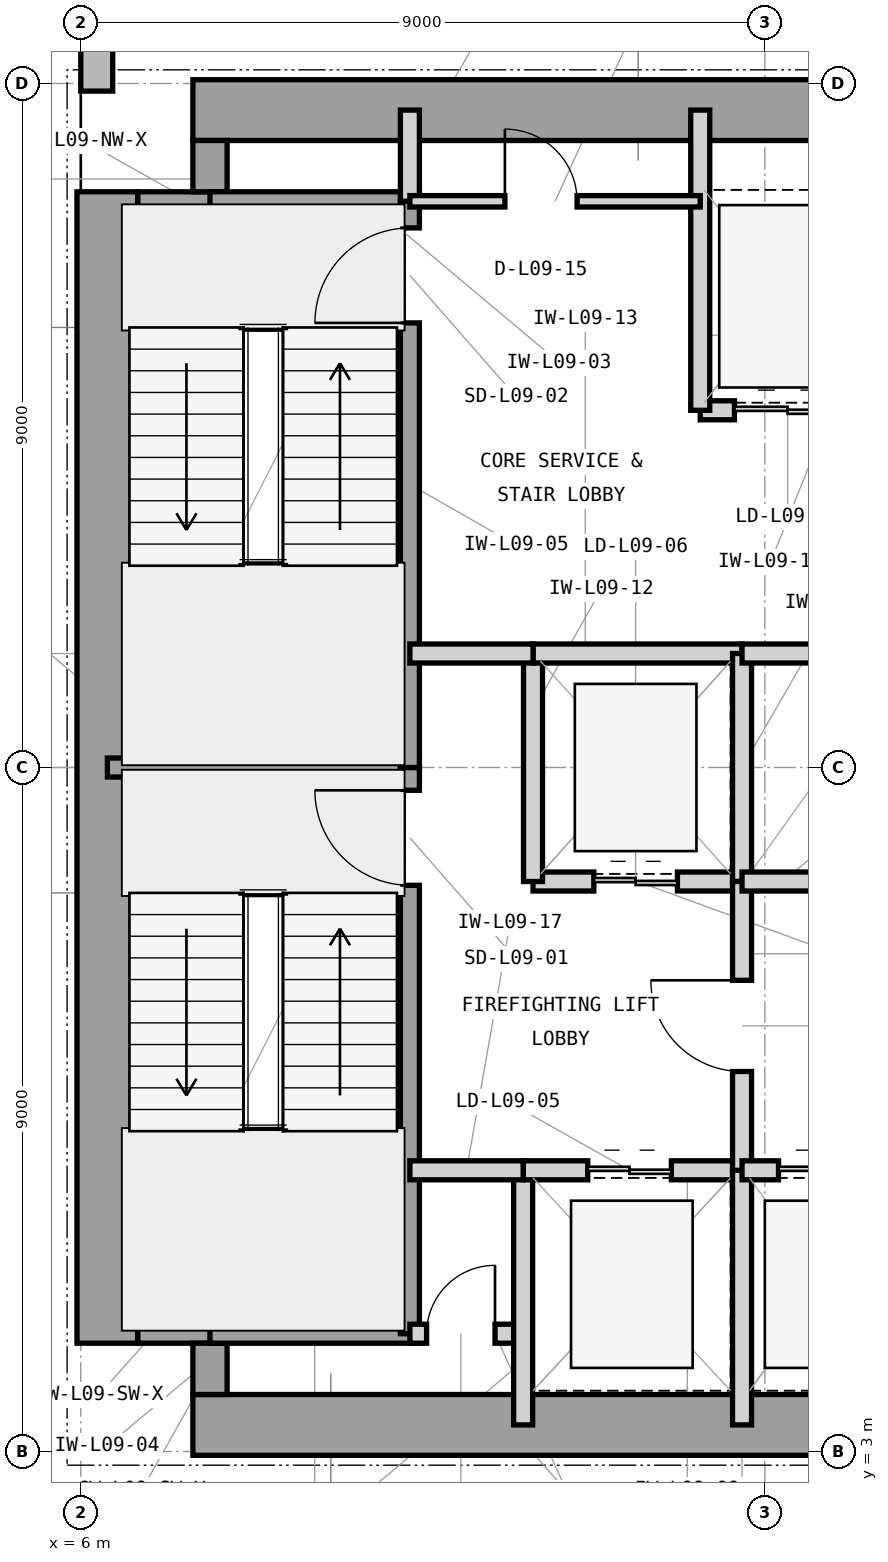
"""IFC4 building model, lengths in metres.
Left out: names, types, materials, properties, quantities, classifications, styles, units other than length and angle.
Written with IfcOpenShell. Run it as: python <this file> out.ifc"""

import sys

from ifc_helpers import new_model, si_unit, direction, frame, frame_2d, origin, place, context, subcontext, project, spatial, rectangle, extrude, element, fill, save


model = new_model("IFC4")
c1 = context("Model", 3, precision=1e-05, world=origin(), true_north=direction((0.0, 1.0)))
c2 = subcontext(c1, "Body", "Model", "MODEL_VIEW")
j1 = project(units=[si_unit("LENGTHUNIT", "METRE"), si_unit("PLANEANGLEUNIT", "RADIAN")], contexts=[c1])
p1 = place(None, origin())
s1 = spatial("IfcSite", under=j1, at=p1, CompositionType="ELEMENT")
p2 = place(p1, origin())
s2 = spatial("IfcBuilding", under=s1, at=p2, CompositionType="ELEMENT")
p3 = place(p2, frame((0.0, 0.0, 42.6)))
s3 = spatial("IfcBuildingStorey", under=s2, at=p3, CompositionType="ELEMENT", Elevation=42.6)
p4 = place(p3, frame((7.475, 3.35, 0.0), z_axis=(0.0, 0.0, 1.0), x_axis=(1.0, 0.0, 0.0)))
e1 = element("IfcWall", 1, at=p4, inside=s3, PredefinedType="SHEAR", context=c2, shape_type="SweptSolid", body=[
    extrude(rectangle(XDim=16.575, YDim=0.8, at=frame_2d((8.288, 0.0))), origin(), (0.0, 0.0, 1.0), 4.2),
])
p5 = place(p3, frame((6.35, 4.425, 0.0), z_axis=(0.0, 0.0, 1.0), x_axis=(0.0, 1.0, 0.0)))
e2 = element("IfcWall", 2, at=p5, inside=s3, PredefinedType="SHEAR", context=c2, shape_type="SweptSolid", body=[
    extrude(rectangle(XDim=15.15, YDim=0.8, at=frame_2d((7.575, 0.0))), origin(), (0.0, 0.0, 1.0), 4.2),
])
p6 = place(p3, frame((7.475, 20.65, 0.0), z_axis=(0.0, 0.0, 1.0), x_axis=(1.0, 0.0, 0.0)))
e3 = element("IfcWall", 3, at=p6, inside=s3, PredefinedType="SHEAR", context=c2, shape_type="SweptSolid", body=[
    extrude(rectangle(XDim=12.325, YDim=0.8, at=frame_2d((6.163, 0.0))), origin(), (0.0, 0.0, 1.0), 4.2),
])
p7 = place(p3, frame((6.75, 4.65, 0.0), z_axis=(0.0, 0.0, 1.0), x_axis=(1.0, 0.0, 0.0)))
e4 = element("IfcWall", 4, at=p7, inside=s3, PredefinedType="SHEAR", context=c2, shape_type="SweptSolid", body=[
    extrude(rectangle(XDim=1.175, YDim=0.45, at=frame_2d((0.587, 0.0))), origin(), (0.0, 0.0, 1.0), 4.2),
])
p8 = place(p3, frame((7.7, 3.75, 0.0), z_axis=(0.0, 0.0, 1.0), x_axis=(0.0, 1.0, 0.0)))
e5 = element("IfcWall", 5, at=p8, inside=s3, PredefinedType="SHEAR", context=c2, shape_type="SweptSolid", body=[
    extrude(rectangle(XDim=0.675, YDim=0.45, at=frame_2d((0.337, 0.0))), origin(), (0.0, 0.0, 1.0), 4.2),
])
p9 = place(p3, frame((6.75, 19.35, 0.0), z_axis=(0.0, 0.0, 1.0), x_axis=(1.0, 0.0, 0.0)))
e6 = element("IfcWall", 6, at=p9, inside=s3, PredefinedType="SHEAR", context=c2, shape_type="SweptSolid", body=[
    extrude(rectangle(XDim=1.175, YDim=0.45, at=frame_2d((0.587, 0.0))), origin(), (0.0, 0.0, 1.0), 4.2),
])
p10 = place(p3, frame((7.7, 19.575, 0.0), z_axis=(0.0, 0.0, 1.0), x_axis=(0.0, 1.0, 0.0)))
e7 = element("IfcWall", 7, at=p10, inside=s3, PredefinedType="SHEAR", context=c2, shape_type="SweptSolid", body=[
    extrude(rectangle(XDim=0.675, YDim=0.45, at=frame_2d((0.337, 0.0))), origin(), (0.0, 0.0, 1.0), 4.2),
])
p11 = place(p3, frame((6.21, 49.4, 0.0), z_axis=(0.0, 0.0, 1.0), x_axis=(0.0, -1.0, 0.0)))
e8 = element("IfcWall", 8, at=p11, inside=s3, PredefinedType="STANDARD", context=c2, shape_type="SweptSolid", body=[
    extrude(rectangle(XDim=28.5, YDim=0.42, at=frame_2d((14.25, 0.0))), origin(), (0.0, 0.0, 1.0), 3.98),
])
p12 = place(p11, frame((15.225, 0.0, 0.85)))
e9 = element("IfcOpeningElement", 9, at=p12, cuts=e8, PredefinedType="OPENING", context=c2, shape_type="SweptSolid", body=[
    extrude(rectangle(XDim=2.8, YDim=2.45, at=frame_2d((1.4, 1.225))), frame((0.0, 0.22, 0.0), z_axis=(0.0, -1.0, 0.0), x_axis=(1.0, 0.0, 0.0)), (0.0, 0.0, 1.0), 0.44),
])
p13 = place(p3, frame((6.35, 12.0, 0.0), z_axis=(0.0, 0.0, 1.0), x_axis=(1.0, 0.0, 0.0)))
e10 = element("IfcWall", 10, at=p13, inside=s3, PredefinedType="SHEAR", context=c2, shape_type="SweptSolid", body=[
    extrude(rectangle(XDim=4.105, YDim=0.25, at=frame_2d((2.052, 0.0))), origin(), (0.0, 0.0, 1.0), 4.2),
])
for number, where, z_axis, x_axis in (
    (11, (7.7, 4.55, 0.0), (0.0, 0.0, 1.0), (1.0, 0.0, 0.0)),
    (12, (7.7, 19.45, 0.0), (0.0, 0.0, 1.0), (1.0, 0.0, 0.0)),
):
    element("IfcWall", number, at=place(p3, frame(where, z_axis=z_axis, x_axis=x_axis)), inside=s3, PredefinedType="SHEAR", context=c2, shape_type="SweptSolid", body=[
        extrude(rectangle(XDim=2.755, YDim=0.25, at=frame_2d((1.377, 0.0))), origin(), (0.0, 0.0, 1.0), 4.2),
    ])
p14 = place(p3, frame((10.33, 4.55, 0.0), z_axis=(0.0, 0.0, 1.0), x_axis=(0.0, 1.0, 0.0)))
e13 = element("IfcWall", 13, at=p14, inside=s3, PredefinedType="SHEAR", context=c2, shape_type="SweptSolid", body=[
    extrude(rectangle(XDim=7.45, YDim=0.25, at=frame_2d((3.725, 0.0))), origin(), (0.0, 0.0, 1.0), 4.2),
])
p15 = place(p14, frame((5.9, 0.0, 0.0)))
e14 = element("IfcOpeningElement", 14, at=p15, cuts=e13, PredefinedType="OPENING", context=c2, shape_type="SweptSolid", body=[
    extrude(rectangle(XDim=1.25, YDim=2.2, at=frame_2d((0.625, 1.1))), frame((0.0, 0.135, 0.0), z_axis=(0.0, -1.0, 0.0), x_axis=(1.0, 0.0, 0.0)), (0.0, 0.0, 1.0), 0.27),
])
p16 = place(p3, frame((10.33, 12.0, 0.0), z_axis=(0.0, 0.0, 1.0), x_axis=(0.0, 1.0, 0.0)))
e15 = element("IfcWall", 15, at=p16, inside=s3, PredefinedType="SHEAR", context=c2, shape_type="SweptSolid", body=[
    extrude(rectangle(XDim=7.45, YDim=0.25, at=frame_2d((3.725, 0.0))), origin(), (0.0, 0.0, 1.0), 4.2),
])
p17 = place(p16, frame((5.85, 0.0, 0.0)))
e16 = element("IfcOpeningElement", 16, at=p17, cuts=e15, PredefinedType="OPENING", context=c2, shape_type="SweptSolid", body=[
    extrude(rectangle(XDim=1.25, YDim=2.2, at=frame_2d((0.625, 1.1))), frame((0.0, 0.135, 0.0), z_axis=(0.0, -1.0, 0.0), x_axis=(1.0, 0.0, 0.0)), (0.0, 0.0, 1.0), 0.27),
])
p18 = place(p3, frame((10.33, 4.55, 0.0), z_axis=(0.0, 0.0, 1.0), x_axis=(1.0, 0.0, 0.0)))
e17 = element("IfcWall", 17, at=p18, inside=s3, PredefinedType="PARTITIONING", context=c2, shape_type="SweptSolid", body=[
    extrude(rectangle(XDim=1.49, YDim=0.25, at=frame_2d((0.745, 0.0))), origin(), (0.0, 0.0, 1.0), 3.97),
])
p19 = place(p18, frame((0.22, 0.0, 0.0)))
e18 = element("IfcOpeningElement", 18, at=p19, cuts=e17, PredefinedType="OPENING", context=c2, shape_type="SweptSolid", body=[
    extrude(rectangle(XDim=0.9, YDim=2.1, at=frame_2d((0.45, 1.05))), frame((0.0, 0.135, 0.0), z_axis=(0.0, -1.0, 0.0), x_axis=(1.0, 0.0, 0.0)), (0.0, 0.0, 1.0), 0.27),
])
p20 = place(p3, frame((11.82, 3.35, 0.0), z_axis=(0.0, 0.0, 1.0), x_axis=(0.0, 1.0, 0.0)))
e19 = element("IfcWall", 19, at=p20, inside=s3, PredefinedType="PARTITIONING", context=c2, shape_type="SweptSolid", body=[
    extrude(rectangle(XDim=3.35, YDim=0.25, at=frame_2d((1.675, 0.0))), origin(), (0.0, 0.0, 1.0), 3.97),
])
p21 = place(p3, frame((10.33, 19.45, 0.0), z_axis=(0.0, 0.0, 1.0), x_axis=(0.0, 1.0, 0.0)))
e20 = element("IfcWall", 20, at=p21, inside=s3, PredefinedType="PARTITIONING", context=c2, shape_type="SweptSolid", body=[
    extrude(rectangle(XDim=1.2, YDim=0.25, at=frame_2d((0.6, 0.0))), origin(), (0.0, 0.0, 1.0), 3.114),
])
p22 = place(p3, frame((11.82, 6.7, 0.0), z_axis=(0.0, 0.0, 1.0), x_axis=(1.0, 0.0, 0.0)))
e21 = element("IfcWall", 21, at=p22, inside=s3, PredefinedType="PARTITIONING", context=c2, shape_type="SweptSolid", body=[
    extrude(rectangle(XDim=2.88, YDim=0.25, at=frame_2d((1.44, 0.0))), origin(), (0.0, 0.0, 1.0), 3.426),
])
p23 = place(p22, frame((0.85, 0.0, 0.0)))
e22 = element("IfcOpeningElement", 22, at=p23, cuts=e21, PredefinedType="OPENING", context=c2, shape_type="SweptSolid", body=[
    extrude(rectangle(XDim=1.1, YDim=2.25, at=frame_2d((0.55, 1.125))), frame((0.0, 0.135, 0.0), z_axis=(0.0, -1.0, 0.0), x_axis=(1.0, 0.0, 0.0)), (0.0, 0.0, 1.0), 0.27),
])
p24 = place(p3, frame((14.7, 3.35, 0.0), z_axis=(0.0, 0.0, 1.0), x_axis=(0.0, 1.0, 0.0)))
e23 = element("IfcWall", 23, at=p24, inside=s3, PredefinedType="PARTITIONING", context=c2, shape_type="SweptSolid", body=[
    extrude(rectangle(XDim=3.35, YDim=0.25, at=frame_2d((1.675, 0.0))), origin(), (0.0, 0.0, 1.0), 3.97),
])
p25 = place(p3, frame((11.95, 10.5, 0.0), z_axis=(0.0, 0.0, 1.0), x_axis=(1.0, 0.0, 0.0)))
e24 = element("IfcWall", 24, at=p25, inside=s3, PredefinedType="PARTITIONING", context=c2, shape_type="SweptSolid", body=[
    extrude(rectangle(XDim=2.75, YDim=0.25, at=frame_2d((1.375, 0.0))), origin(), (0.0, 0.0, 1.0), 3.426),
])
p26 = place(p25, frame((0.8, 0.0, 0.0)))
e25 = element("IfcOpeningElement", 25, at=p26, cuts=e24, PredefinedType="OPENING", context=c2, shape_type="SweptSolid", body=[
    extrude(rectangle(XDim=1.1, YDim=2.25, at=frame_2d((0.55, 1.125))), frame((0.0, 0.135, 0.0), z_axis=(0.0, -1.0, 0.0), x_axis=(1.0, 0.0, 0.0)), (0.0, 0.0, 1.0), 0.27),
])
p27 = place(p3, frame((11.95, 10.5, 0.0), z_axis=(0.0, 0.0, 1.0), x_axis=(0.0, 1.0, 0.0)))
e26 = element("IfcWall", 26, at=p27, inside=s3, PredefinedType="PARTITIONING", context=c2, shape_type="SweptSolid", body=[
    extrude(rectangle(XDim=3.0, YDim=0.25, at=frame_2d((1.5, 0.0))), origin(), (0.0, 0.0, 1.0), 3.97),
])
p28 = place(p3, frame((11.95, 13.5, 0.0), z_axis=(0.0, 0.0, 1.0), x_axis=(1.0, 0.0, 0.0)))
e27 = element("IfcWall", 27, at=p28, inside=s3, PredefinedType="PARTITIONING", context=c2, shape_type="SweptSolid", body=[
    extrude(rectangle(XDim=2.75, YDim=0.25, at=frame_2d((1.375, 0.0))), origin(), (0.0, 0.0, 1.0), 3.426),
])
p29 = place(p3, frame((14.7, 10.5, 0.0), z_axis=(0.0, 0.0, 1.0), x_axis=(0.0, 1.0, 0.0)))
e28 = element("IfcWall", 28, at=p29, inside=s3, PredefinedType="PARTITIONING", context=c2, shape_type="SweptSolid", body=[
    extrude(rectangle(XDim=3.0, YDim=0.25, at=frame_2d((1.5, 0.0))), origin(), (0.0, 0.0, 1.0), 3.97),
])
p30 = place(p3, frame((14.7, 6.7, 0.0), z_axis=(0.0, 0.0, 1.0), x_axis=(0.0, 1.0, 0.0)))
e29 = element("IfcWall", 29, at=p30, inside=s3, PredefinedType="PARTITIONING", context=c2, shape_type="SweptSolid", body=[
    extrude(rectangle(XDim=3.8, YDim=0.25, at=frame_2d((1.9, 0.0))), origin(), (0.0, 0.0, 1.0), 3.97),
])
p31 = place(p30, frame((1.3, 0.0, 0.0)))
e30 = element("IfcOpeningElement", 30, at=p31, cuts=e29, PredefinedType="OPENING", context=c2, shape_type="SweptSolid", body=[
    extrude(rectangle(XDim=1.2, YDim=2.2, at=frame_2d((0.6, 1.1))), frame((0.0, 0.135, 0.0), z_axis=(0.0, -1.0, 0.0), x_axis=(1.0, 0.0, 0.0)), (0.0, 0.0, 1.0), 0.27),
])
p32 = place(p3, frame((10.33, 13.5, 0.0), z_axis=(0.0, 0.0, 1.0), x_axis=(1.0, 0.0, 0.0)))
e31 = element("IfcWall", 31, at=p32, inside=s3, PredefinedType="PARTITIONING", context=c2, shape_type="SweptSolid", body=[
    extrude(rectangle(XDim=1.62, YDim=0.25, at=frame_2d((0.81, 0.0))), origin(), (0.0, 0.0, 1.0), 3.426),
])
p33 = place(p3, frame((10.33, 6.7, 0.0), z_axis=(0.0, 0.0, 1.0), x_axis=(1.0, 0.0, 0.0)))
e32 = element("IfcWall", 32, at=p33, inside=s3, PredefinedType="PARTITIONING", context=c2, shape_type="SweptSolid", body=[
    extrude(rectangle(XDim=1.49, YDim=0.25, at=frame_2d((0.745, 0.0))), origin(), (0.0, 0.0, 1.0), 3.426),
])
p34 = place(p3, frame((14.15, 16.7, 0.0), z_axis=(0.0, 0.0, 1.0), x_axis=(1.0, 0.0, 0.0)))
e33 = element("IfcWall", 33, at=p34, inside=s3, PredefinedType="PARTITIONING", context=c2, shape_type="SweptSolid", body=[
    extrude(rectangle(XDim=2.3, YDim=0.25, at=frame_2d((1.15, 0.0))), origin(), (0.0, 0.0, 1.0), 3.426),
])
p35 = place(p34, frame((0.45, 0.0, 0.0)))
e34 = element("IfcOpeningElement", 34, at=p35, cuts=e33, PredefinedType="OPENING", context=c2, shape_type="SweptSolid", body=[
    extrude(rectangle(XDim=1.4, YDim=2.35, at=frame_2d((0.7, 1.175))), frame((0.0, 0.135, 0.0), z_axis=(0.0, -1.0, 0.0), x_axis=(1.0, 0.0, 0.0)), (0.0, 0.0, 1.0), 0.27),
])
p36 = place(p3, frame((14.15, 16.7, 0.0), z_axis=(0.0, 0.0, 1.0), x_axis=(0.0, 1.0, 0.0)))
e35 = element("IfcWall", 35, at=p36, inside=s3, PredefinedType="PARTITIONING", context=c2, shape_type="SweptSolid", body=[
    extrude(rectangle(XDim=3.95, YDim=0.25, at=frame_2d((1.975, 0.0))), origin(), (0.0, 0.0, 1.0), 3.97),
])
p37 = place(p3, frame((14.7, 6.7, 0.0), z_axis=(0.0, 0.0, 1.0), x_axis=(1.0, 0.0, 0.0)))
e36 = element("IfcWall", 36, at=p37, inside=s3, PredefinedType="PARTITIONING", context=c2, shape_type="SweptSolid", body=[
    extrude(rectangle(XDim=2.15, YDim=0.25, at=frame_2d((1.075, 0.0))), origin(), (0.0, 0.0, 1.0), 3.426),
])
p38 = place(p37, frame((0.48, 0.0, 0.0)))
e37 = element("IfcOpeningElement", 37, at=p38, cuts=e36, PredefinedType="OPENING", context=c2, shape_type="SweptSolid", body=[
    extrude(rectangle(XDim=1.15, YDim=2.25, at=frame_2d((0.575, 1.125))), frame((0.0, 0.135, 0.0), z_axis=(0.0, -1.0, 0.0), x_axis=(1.0, 0.0, 0.0)), (0.0, 0.0, 1.0), 0.27),
])
p39 = place(p3, frame((14.7, 10.5, 0.0), z_axis=(0.0, 0.0, 1.0), x_axis=(1.0, 0.0, 0.0)))
e38 = element("IfcWall", 38, at=p39, inside=s3, PredefinedType="PARTITIONING", context=c2, shape_type="SweptSolid", body=[
    extrude(rectangle(XDim=2.15, YDim=0.25, at=frame_2d((1.075, 0.0))), origin(), (0.0, 0.0, 1.0), 3.426),
])
p40 = place(p3, frame((14.7, 13.5, 0.0), z_axis=(0.0, 0.0, 1.0), x_axis=(1.0, 0.0, 0.0)))
e39 = element("IfcWall", 39, at=p40, inside=s3, PredefinedType="PARTITIONING", context=c2, shape_type="SweptSolid", body=[
    extrude(rectangle(XDim=8.95, YDim=0.25, at=frame_2d((4.475, 0.0))), origin(), (0.0, 0.0, 1.0), 3.426),
])
p41 = place(p3, frame((10.33, 19.45, 0.0), z_axis=(0.0, 0.0, 1.0), x_axis=(1.0, 0.0, 0.0)))
e40 = element("IfcWall", 40, at=p41, inside=s3, PredefinedType="PARTITIONING", context=c2, shape_type="SweptSolid", body=[
    extrude(rectangle(XDim=3.82, YDim=0.15, at=frame_2d((1.91, 0.0))), origin(), (0.0, 0.0, 1.0), 3.97),
])
p42 = place(p41, frame((1.25, 0.0, 0.0)))
e41 = element("IfcOpeningElement", 41, at=p42, cuts=e40, PredefinedType="OPENING", context=c2, shape_type="SweptSolid", body=[
    extrude(rectangle(XDim=0.95, YDim=2.1, at=frame_2d((0.475, 1.05))), frame((0.0, 0.085, 0.0), z_axis=(0.0, -1.0, 0.0), x_axis=(1.0, 0.0, 0.0)), (0.0, 0.0, 1.0), 0.17),
])
p43 = place(p15, origin())
e42 = element("IfcDoor", 42, at=p43, inside=s3, OperationType="SINGLE_SWING_RIGHT", PredefinedType="DOOR", context=c2, shape_type="SweptSolid", body=[
    extrude(rectangle(XDim=1.25, YDim=2.2, at=frame_2d((0.625, 1.1))), frame((0.0, 0.025, 0.0), z_axis=(0.0, -1.0, 0.0), x_axis=(1.0, 0.0, 0.0)), (0.0, 0.0, 1.0), 0.05),
])
fill(e14, e42)
p44 = place(p17, origin())
e43 = element("IfcDoor", 43, at=p44, inside=s3, OperationType="SINGLE_SWING_LEFT", PredefinedType="DOOR", context=c2, shape_type="SweptSolid", body=[
    extrude(rectangle(XDim=1.25, YDim=2.2, at=frame_2d((0.625, 1.1))), frame((0.0, 0.025, 0.0), z_axis=(0.0, -1.0, 0.0), x_axis=(1.0, 0.0, 0.0)), (0.0, 0.0, 1.0), 0.05),
])
fill(e16, e43)
p45 = place(p19, origin())
e44 = element("IfcDoor", 44, at=p45, inside=s3, OperationType="SINGLE_SWING_RIGHT", PredefinedType="TRAPDOOR", context=c2, shape_type="SweptSolid", body=[
    extrude(rectangle(XDim=0.9, YDim=2.1, at=frame_2d((0.45, 1.05))), frame((0.0, 0.025, 0.0), z_axis=(0.0, -1.0, 0.0), x_axis=(1.0, 0.0, 0.0)), (0.0, 0.0, 1.0), 0.05),
])
fill(e18, e44)
p46 = place(p23, origin())
e45 = element("IfcDoor", 45, at=p46, inside=s3, OperationType="DOUBLE_DOOR_SLIDING", PredefinedType="DOOR", context=c2, shape_type="SweptSolid", body=[
    extrude(rectangle(XDim=1.1, YDim=2.25, at=frame_2d((0.55, 1.125))), frame((0.0, 0.025, 0.0), z_axis=(0.0, -1.0, 0.0), x_axis=(1.0, 0.0, 0.0)), (0.0, 0.0, 1.0), 0.05),
])
fill(e22, e45)
p47 = place(p26, origin())
e46 = element("IfcDoor", 46, at=p47, inside=s3, OperationType="DOUBLE_DOOR_SLIDING", PredefinedType="DOOR", context=c2, shape_type="SweptSolid", body=[
    extrude(rectangle(XDim=1.1, YDim=2.25, at=frame_2d((0.55, 1.125))), frame((0.0, 0.025, 0.0), z_axis=(0.0, -1.0, 0.0), x_axis=(1.0, 0.0, 0.0)), (0.0, 0.0, 1.0), 0.05),
])
fill(e25, e46)
p48 = place(p31, origin())
e47 = element("IfcDoor", 47, at=p48, inside=s3, OperationType="SINGLE_SWING_RIGHT", PredefinedType="DOOR", context=c2, shape_type="SweptSolid", body=[
    extrude(rectangle(XDim=1.2, YDim=2.2, at=frame_2d((0.6, 1.1))), frame((0.0, 0.025, 0.0), z_axis=(0.0, -1.0, 0.0), x_axis=(1.0, 0.0, 0.0)), (0.0, 0.0, 1.0), 0.05),
])
fill(e30, e47)
p49 = place(p35, origin())
e48 = element("IfcDoor", 48, at=p49, inside=s3, OperationType="DOUBLE_DOOR_SLIDING", PredefinedType="DOOR", context=c2, shape_type="SweptSolid", body=[
    extrude(rectangle(XDim=1.4, YDim=2.35, at=frame_2d((0.7, 1.175))), frame((0.0, 0.025, 0.0), z_axis=(0.0, -1.0, 0.0), x_axis=(1.0, 0.0, 0.0)), (0.0, 0.0, 1.0), 0.05),
])
fill(e34, e48)
p50 = place(p38, origin())
e49 = element("IfcDoor", 49, at=p50, inside=s3, OperationType="DOUBLE_DOOR_SLIDING", PredefinedType="DOOR", context=c2, shape_type="SweptSolid", body=[
    extrude(rectangle(XDim=1.15, YDim=2.25, at=frame_2d((0.575, 1.125))), frame((0.0, 0.025, 0.0), z_axis=(0.0, -1.0, 0.0), x_axis=(1.0, 0.0, 0.0)), (0.0, 0.0, 1.0), 0.05),
])
fill(e37, e49)
p51 = place(p42, origin())
e50 = element("IfcDoor", 50, at=p51, inside=s3, OperationType="SINGLE_SWING_LEFT", PredefinedType="DOOR", context=c2, shape_type="SweptSolid", body=[
    extrude(rectangle(XDim=0.95, YDim=2.1, at=frame_2d((0.475, 1.05))), frame((0.0, 0.025, 0.0), z_axis=(0.0, -1.0, 0.0), x_axis=(1.0, 0.0, 0.0)), (0.0, 0.0, 1.0), 0.05),
])
fill(e41, e50)
save(model, sys.argv[1])
